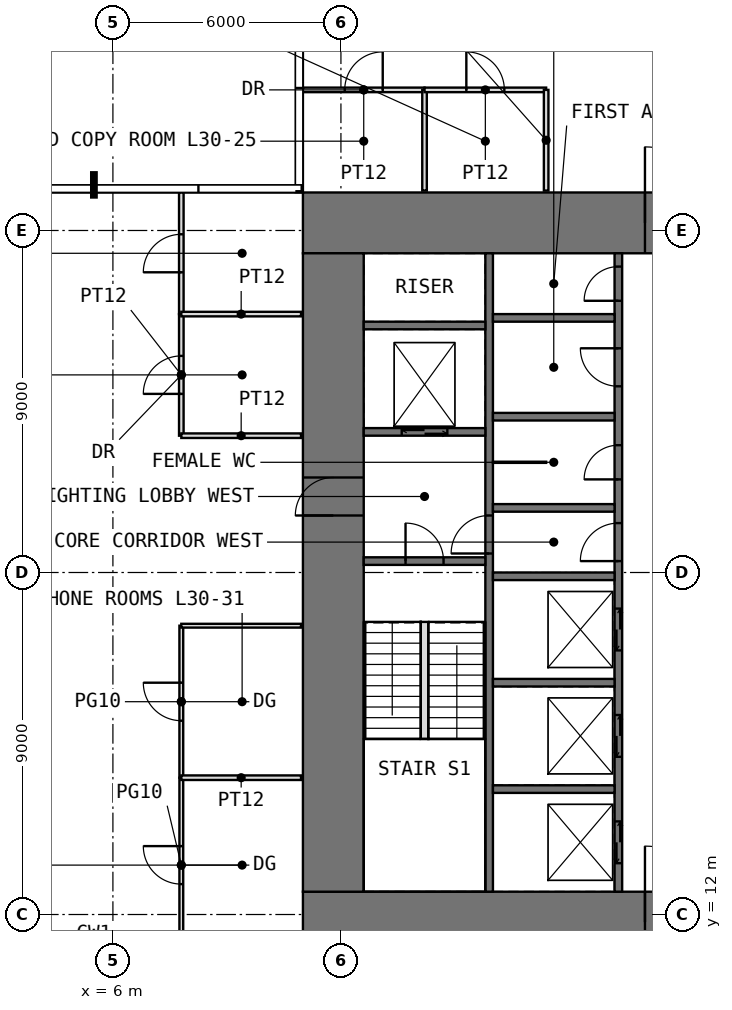
"""IFC4 building model, lengths in metres.
Left out: names, types, materials, properties, quantities, classifications, styles, units other than length and angle.
Written with IfcOpenShell. Run it as: python <this file> out.ifc"""

import sys

from ifc_helpers import new_model, si_unit, direction, frame, frame_2d, origin, place, context, subcontext, project, spatial, rectangle, extrude, element, fill, save


model = new_model("IFC4")
c1 = context("Model", 3, precision=1e-05, world=origin(), true_north=direction((0.0, 1.0)))
c2 = subcontext(c1, "Body", "Model", "MODEL_VIEW")
j1 = project(units=[si_unit("LENGTHUNIT", "METRE"), si_unit("PLANEANGLEUNIT", "RADIAN")], contexts=[c1])
p1 = place(None, origin())
s1 = spatial("IfcSite", under=j1, at=p1, CompositionType="ELEMENT")
p2 = place(p1, origin())
s2 = spatial("IfcBuilding", under=s1, at=p2, CompositionType="ELEMENT")
p3 = place(p2, frame((0.0, 0.0, 128.5)))
s3 = spatial("IfcBuildingStorey", under=s2, at=p3, CompositionType="ELEMENT", Elevation=128.5)
p4 = place(p3, frame((11.0, 11.8, -0.05), z_axis=(0.0, 0.0, 1.0), x_axis=(1.0, 0.0, 0.0)))
e1 = element("IfcWall", 1, at=p4, inside=s3, PredefinedType="SHEAR", context=c2, shape_type="SweptSolid", body=[
    extrude(rectangle(XDim=20.0, YDim=1.6, at=frame_2d((10.0, 0.0))), origin(), (0.0, 0.0, 1.0), 4.0),
])
p5 = place(p4, frame((9.0, 0.0, 0.05)))
e2 = element("IfcOpeningElement", 2, at=p5, cuts=e1, PredefinedType="OPENING", context=c2, shape_type="SweptSolid", body=[
    extrude(rectangle(XDim=2.0, YDim=2.2, at=frame_2d((1.0, 1.1))), frame((0.0, 0.81, 0.0), z_axis=(0.0, -1.0, 0.0), x_axis=(1.0, 0.0, 0.0)), (0.0, 0.0, 1.0), 1.62),
])
p6 = place(p3, frame((11.0, 30.2, -0.05), z_axis=(0.0, 0.0, 1.0), x_axis=(1.0, 0.0, 0.0)))
e3 = element("IfcWall", 3, at=p6, inside=s3, PredefinedType="SHEAR", context=c2, shape_type="SweptSolid", body=[
    extrude(rectangle(XDim=20.0, YDim=1.6, at=frame_2d((10.0, 0.0))), origin(), (0.0, 0.0, 1.0), 4.0),
])
p7 = place(p6, frame((9.0, 0.0, 0.05)))
e4 = element("IfcOpeningElement", 4, at=p7, cuts=e3, PredefinedType="OPENING", context=c2, shape_type="SweptSolid", body=[
    extrude(rectangle(XDim=2.0, YDim=2.2, at=frame_2d((1.0, 1.1))), frame((0.0, 0.81, 0.0), z_axis=(0.0, -1.0, 0.0), x_axis=(1.0, 0.0, 0.0)), (0.0, 0.0, 1.0), 1.62),
])
p8 = place(p3, frame((11.8, 12.6, -0.05), z_axis=(0.0, 0.0, 1.0), x_axis=(0.0, 1.0, 0.0)))
e5 = element("IfcWall", 5, at=p8, inside=s3, PredefinedType="SHEAR", context=c2, shape_type="SweptSolid", body=[
    extrude(rectangle(XDim=16.8, YDim=1.6, at=frame_2d((8.4, 0.0))), origin(), (0.0, 0.0, 1.0), 4.0),
])
p9 = place(p8, frame((9.9, 0.0, 0.05)))
e6 = element("IfcOpeningElement", 6, at=p9, cuts=e5, PredefinedType="OPENING", context=c2, shape_type="SweptSolid", body=[
    extrude(rectangle(XDim=1.0, YDim=2.2, at=frame_2d((0.5, 1.1))), frame((0.0, 0.81, 0.0), z_axis=(0.0, -1.0, 0.0), x_axis=(1.0, 0.0, 0.0)), (0.0, 0.0, 1.0), 1.62),
])
p10 = place(p3, frame((15.9, 12.6, -0.05), z_axis=(0.0, 0.0, 1.0), x_axis=(0.0, 1.0, 0.0)))
e7 = element("IfcWall", 7, at=p10, inside=s3, PredefinedType="SHEAR", context=c2, shape_type="SweptSolid", body=[
    extrude(rectangle(XDim=16.8, YDim=0.2, at=frame_2d((8.4, 0.0))), origin(), (0.0, 0.0, 1.0), 4.0),
])
p11 = place(p10, frame((8.9, 0.0, 0.05)))
e8 = element("IfcOpeningElement", 8, at=p11, cuts=e7, PredefinedType="OPENING", context=c2, shape_type="SweptSolid", body=[
    extrude(rectangle(XDim=1.0, YDim=2.2, at=frame_2d((0.5, 1.1))), frame((0.0, 0.11, 0.0), z_axis=(0.0, -1.0, 0.0), x_axis=(1.0, 0.0, 0.0)), (0.0, 0.0, 1.0), 0.22),
])
p12 = place(p3, frame((19.3, 12.6, -0.05), z_axis=(0.0, 0.0, 1.0), x_axis=(0.0, 1.0, 0.0)))
e9 = element("IfcWall", 9, at=p12, inside=s3, PredefinedType="SHEAR", context=c2, shape_type="SweptSolid", body=[
    extrude(rectangle(XDim=16.8, YDim=0.2, at=frame_2d((8.4, 0.0))), origin(), (0.0, 0.0, 1.0), 4.0),
])
p13 = place(p12, frame((8.7, 0.0, 0.05)))
e10 = element("IfcOpeningElement", 10, at=p13, cuts=e9, PredefinedType="OPENING", context=c2, shape_type="SweptSolid", body=[
    extrude(rectangle(XDim=1.0, YDim=2.2, at=frame_2d((0.5, 1.1))), frame((0.0, 0.11, 0.0), z_axis=(0.0, -1.0, 0.0), x_axis=(1.0, 0.0, 0.0)), (0.0, 0.0, 1.0), 0.22),
])
p14 = place(p12, frame((10.85, 0.0, 0.05)))
e11 = element("IfcOpeningElement", 11, at=p14, cuts=e9, PredefinedType="OPENING", context=c2, shape_type="SweptSolid", body=[
    extrude(rectangle(XDim=0.9, YDim=2.2, at=frame_2d((0.45, 1.1))), frame((0.0, 0.11, 0.0), z_axis=(0.0, -1.0, 0.0), x_axis=(1.0, 0.0, 0.0)), (0.0, 0.0, 1.0), 0.22),
])
p15 = place(p12, frame((13.3, 0.0, 0.05)))
e12 = element("IfcOpeningElement", 12, at=p15, cuts=e9, PredefinedType="OPENING", context=c2, shape_type="SweptSolid", body=[
    extrude(rectangle(XDim=1.0, YDim=2.2, at=frame_2d((0.5, 1.1))), frame((0.0, 0.11, 0.0), z_axis=(0.0, -1.0, 0.0), x_axis=(1.0, 0.0, 0.0)), (0.0, 0.0, 1.0), 0.22),
])
p16 = place(p12, frame((15.55, 0.0, 0.05)))
e13 = element("IfcOpeningElement", 13, at=p16, cuts=e9, PredefinedType="OPENING", context=c2, shape_type="SweptSolid", body=[
    extrude(rectangle(XDim=0.9, YDim=2.2, at=frame_2d((0.45, 1.1))), frame((0.0, 0.11, 0.0), z_axis=(0.0, -1.0, 0.0), x_axis=(1.0, 0.0, 0.0)), (0.0, 0.0, 1.0), 0.22),
])
p17 = place(p12, frame((0.75, 0.0, 0.05)))
e14 = element("IfcOpeningElement", 14, at=p17, cuts=e9, PredefinedType="OPENING", context=c2, shape_type="SweptSolid", body=[
    extrude(rectangle(XDim=1.1, YDim=2.2, at=frame_2d((0.55, 1.1))), frame((0.0, 0.11, 0.0), z_axis=(0.0, -1.0, 0.0), x_axis=(1.0, 0.0, 0.0)), (0.0, 0.0, 1.0), 0.22),
])
p18 = place(p12, frame((3.55, 0.0, 0.05)))
e15 = element("IfcOpeningElement", 15, at=p18, cuts=e9, PredefinedType="OPENING", context=c2, shape_type="SweptSolid", body=[
    extrude(rectangle(XDim=1.1, YDim=2.2, at=frame_2d((0.55, 1.1))), frame((0.0, 0.11, 0.0), z_axis=(0.0, -1.0, 0.0), x_axis=(1.0, 0.0, 0.0)), (0.0, 0.0, 1.0), 0.22),
])
p19 = place(p12, frame((6.35, 0.0, 0.05)))
e16 = element("IfcOpeningElement", 16, at=p19, cuts=e9, PredefinedType="OPENING", context=c2, shape_type="SweptSolid", body=[
    extrude(rectangle(XDim=1.1, YDim=2.2, at=frame_2d((0.55, 1.1))), frame((0.0, 0.11, 0.0), z_axis=(0.0, -1.0, 0.0), x_axis=(1.0, 0.0, 0.0)), (0.0, 0.0, 1.0), 0.22),
])
p20 = place(p3, frame((12.6, 21.3, -0.05), z_axis=(0.0, 0.0, 1.0), x_axis=(1.0, 0.0, 0.0)))
e17 = element("IfcWall", 17, at=p20, inside=s3, PredefinedType="SHEAR", context=c2, shape_type="SweptSolid", body=[
    extrude(rectangle(XDim=3.2, YDim=0.2, at=frame_2d((1.6, 0.0))), origin(), (0.0, 0.0, 1.0), 4.0),
])
p21 = place(p20, frame((1.1, 0.0, 0.05)))
e18 = element("IfcOpeningElement", 18, at=p21, cuts=e17, PredefinedType="OPENING", context=c2, shape_type="SweptSolid", body=[
    extrude(rectangle(XDim=1.0, YDim=2.2, at=frame_2d((0.5, 1.1))), frame((0.0, 0.11, 0.0), z_axis=(0.0, -1.0, 0.0), x_axis=(1.0, 0.0, 0.0)), (0.0, 0.0, 1.0), 0.22),
])
p22 = place(p3, frame((12.6, 24.7, -0.05), z_axis=(0.0, 0.0, 1.0), x_axis=(1.0, 0.0, 0.0)))
e19 = element("IfcWall", 19, at=p22, inside=s3, PredefinedType="SHEAR", context=c2, shape_type="SweptSolid", body=[
    extrude(rectangle(XDim=3.2, YDim=0.2, at=frame_2d((1.6, 0.0))), origin(), (0.0, 0.0, 1.0), 4.0),
])
p23 = place(p22, frame((1.0, 0.0, 0.05)))
e20 = element("IfcOpeningElement", 20, at=p23, cuts=e19, PredefinedType="OPENING", context=c2, shape_type="SweptSolid", body=[
    extrude(rectangle(XDim=1.2, YDim=2.2, at=frame_2d((0.6, 1.1))), frame((0.0, 0.11, 0.0), z_axis=(0.0, -1.0, 0.0), x_axis=(1.0, 0.0, 0.0)), (0.0, 0.0, 1.0), 0.22),
])
for number, where, z_axis, x_axis in (
    (21, (12.6, 27.5, -0.05), (0.0, 0.0, 1.0), (1.0, 0.0, 0.0)),
    (22, (16.0, 15.3, -0.05), (0.0, 0.0, 1.0), (1.0, 0.0, 0.0)),
    (23, (16.0, 18.1, -0.05), (0.0, 0.0, 1.0), (1.0, 0.0, 0.0)),
    (24, (16.0, 20.9, -0.05), (0.0, 0.0, 1.0), (1.0, 0.0, 0.0)),
    (25, (16.0, 22.7, -0.05), (0.0, 0.0, 1.0), (1.0, 0.0, 0.0)),
    (26, (16.0, 25.1, -0.05), (0.0, 0.0, 1.0), (1.0, 0.0, 0.0)),
    (27, (16.0, 27.7, -0.05), (0.0, 0.0, 1.0), (1.0, 0.0, 0.0)),
):
    element("IfcWall", number, at=place(p3, frame(where, z_axis=z_axis, x_axis=x_axis)), inside=s3, PredefinedType="SHEAR", context=c2, shape_type="SweptSolid", body=[
        extrude(rectangle(XDim=3.2, YDim=0.2, at=frame_2d((1.6, 0.0))), origin(), (0.0, 0.0, 1.0), 4.0),
    ])
p24 = place(p3, frame((16.0, 23.9, 0.0), z_axis=(0.0, 0.0, 1.0), x_axis=(1.0, 0.0, 0.0)))
e28 = element("IfcWall", 28, at=p24, inside=s3, PredefinedType="PARTITIONING", context=c2, shape_type="SweptSolid", body=[
    extrude(rectangle(XDim=1.4, YDim=0.03, at=frame_2d((0.7, 0.0))), origin(), (0.0, 0.0, 1.0), 3.75),
])
p25 = place(p3, frame((7.8, 11.0, 0.0), z_axis=(0.0, 0.0, 1.0), x_axis=(0.0, 1.0, 0.0)))
e29 = element("IfcWall", 29, at=p25, inside=s3, PredefinedType="PARTITIONING", context=c2, shape_type="SweptSolid", body=[
    extrude(rectangle(XDim=4.6, YDim=0.1, at=frame_2d((2.3, 0.0))), origin(), (0.0, 0.0, 1.0), 3.75),
])
p26 = place(p25, frame((1.8, 0.0, 0.0)))
e30 = element("IfcOpeningElement", 30, at=p26, cuts=e29, PredefinedType="OPENING", context=c2, shape_type="SweptSolid", body=[
    extrude(rectangle(XDim=1.0, YDim=2.4, at=frame_2d((0.5, 1.2))), frame((0.0, 0.06, 0.0), z_axis=(0.0, -1.0, 0.0), x_axis=(1.0, 0.0, 0.0)), (0.0, 0.0, 1.0), 0.12),
])
p27 = place(p3, frame((7.8, 15.6, 0.0), z_axis=(0.0, 0.0, 1.0), x_axis=(0.0, 1.0, 0.0)))
e31 = element("IfcWall", 31, at=p27, inside=s3, PredefinedType="PARTITIONING", context=c2, shape_type="SweptSolid", body=[
    extrude(rectangle(XDim=4.0, YDim=0.1, at=frame_2d((2.0, 0.0))), origin(), (0.0, 0.0, 1.0), 3.75),
])
p28 = place(p27, frame((1.5, 0.0, 0.0)))
e32 = element("IfcOpeningElement", 32, at=p28, cuts=e31, PredefinedType="OPENING", context=c2, shape_type="SweptSolid", body=[
    extrude(rectangle(XDim=1.0, YDim=2.4, at=frame_2d((0.5, 1.2))), frame((0.0, 0.06, 0.0), z_axis=(0.0, -1.0, 0.0), x_axis=(1.0, 0.0, 0.0)), (0.0, 0.0, 1.0), 0.12),
])
p29 = place(p3, frame((7.8, 15.6, 0.0), z_axis=(0.0, 0.0, 1.0), x_axis=(1.0, 0.0, 0.0)))
e33 = element("IfcWall", 33, at=p29, inside=s3, PredefinedType="PARTITIONING", context=c2, shape_type="SweptSolid", body=[
    extrude(rectangle(XDim=3.15, YDim=0.12, at=frame_2d((1.575, 0.0))), origin(), (0.0, 0.0, 1.0), 3.75),
])
p30 = place(p3, frame((7.8, 19.6, 0.0), z_axis=(0.0, 0.0, 1.0), x_axis=(1.0, 0.0, 0.0)))
e34 = element("IfcWall", 34, at=p30, inside=s3, PredefinedType="PARTITIONING", context=c2, shape_type="SweptSolid", body=[
    extrude(rectangle(XDim=3.15, YDim=0.1, at=frame_2d((1.575, 0.0))), origin(), (0.0, 0.0, 1.0), 3.75),
])
p31 = place(p3, frame((7.8, 24.6, 0.0), z_axis=(0.0, 0.0, 1.0), x_axis=(0.0, 1.0, 0.0)))
e35 = element("IfcWall", 35, at=p31, inside=s3, PredefinedType="PARTITIONING", context=c2, shape_type="SweptSolid", body=[
    extrude(rectangle(XDim=3.2, YDim=0.12, at=frame_2d((1.6, 0.0))), origin(), (0.0, 0.0, 1.0), 3.75),
])
p32 = place(p31, frame((1.1, 0.0, 0.0)))
e36 = element("IfcOpeningElement", 36, at=p32, cuts=e35, PredefinedType="OPENING", context=c2, shape_type="SweptSolid", body=[
    extrude(rectangle(XDim=1.0, YDim=2.2, at=frame_2d((0.5, 1.1))), frame((0.0, 0.07, 0.0), z_axis=(0.0, -1.0, 0.0), x_axis=(1.0, 0.0, 0.0)), (0.0, 0.0, 1.0), 0.14),
])
p33 = place(p3, frame((7.8, 24.6, 0.0), z_axis=(0.0, 0.0, 1.0), x_axis=(1.0, 0.0, 0.0)))
e37 = element("IfcWall", 37, at=p33, inside=s3, PredefinedType="PARTITIONING", context=c2, shape_type="SweptSolid", body=[
    extrude(rectangle(XDim=3.15, YDim=0.12, at=frame_2d((1.575, 0.0))), origin(), (0.0, 0.0, 1.0), 3.75),
])
p34 = place(p3, frame((7.8, 27.8, 0.0), z_axis=(0.0, 0.0, 1.0), x_axis=(0.0, 1.0, 0.0)))
e38 = element("IfcWall", 38, at=p34, inside=s3, PredefinedType="PARTITIONING", context=c2, shape_type="SweptSolid", body=[
    extrude(rectangle(XDim=3.2, YDim=0.12, at=frame_2d((1.6, 0.0))), origin(), (0.0, 0.0, 1.0), 3.75),
])
p35 = place(p34, frame((1.1, 0.0, 0.0)))
e39 = element("IfcOpeningElement", 39, at=p35, cuts=e38, PredefinedType="OPENING", context=c2, shape_type="SweptSolid", body=[
    extrude(rectangle(XDim=1.0, YDim=2.2, at=frame_2d((0.5, 1.1))), frame((0.0, 0.07, 0.0), z_axis=(0.0, -1.0, 0.0), x_axis=(1.0, 0.0, 0.0)), (0.0, 0.0, 1.0), 0.14),
])
p36 = place(p3, frame((7.8, 27.8, 0.0), z_axis=(0.0, 0.0, 1.0), x_axis=(1.0, 0.0, 0.0)))
e40 = element("IfcWall", 40, at=p36, inside=s3, PredefinedType="PARTITIONING", context=c2, shape_type="SweptSolid", body=[
    extrude(rectangle(XDim=3.15, YDim=0.12, at=frame_2d((1.575, 0.0))), origin(), (0.0, 0.0, 1.0), 3.75),
])
p37 = place(p3, frame((11.0, 33.7, 0.0), z_axis=(0.0, 0.0, 1.0), x_axis=(1.0, 0.0, 0.0)))
e41 = element("IfcWall", 41, at=p37, inside=s3, PredefinedType="PARTITIONING", context=c2, shape_type="SweptSolid", body=[
    extrude(rectangle(XDim=3.2, YDim=0.12, at=frame_2d((1.6, 0.0))), origin(), (0.0, 0.0, 1.0), 3.75),
])
p38 = place(p37, frame((1.1, 0.0, 0.0)))
e42 = element("IfcOpeningElement", 42, at=p38, cuts=e41, PredefinedType="OPENING", context=c2, shape_type="SweptSolid", body=[
    extrude(rectangle(XDim=1.0, YDim=2.2, at=frame_2d((0.5, 1.1))), frame((0.0, 0.07, 0.0), z_axis=(0.0, -1.0, 0.0), x_axis=(1.0, 0.0, 0.0)), (0.0, 0.0, 1.0), 0.14),
])
p39 = place(p3, frame((14.2, 31.05, 0.0), z_axis=(0.0, 0.0, 1.0), x_axis=(0.0, 1.0, 0.0)))
e43 = element("IfcWall", 43, at=p39, inside=s3, PredefinedType="PARTITIONING", context=c2, shape_type="SweptSolid", body=[
    extrude(rectangle(XDim=2.65, YDim=0.12, at=frame_2d((1.325, 0.0))), origin(), (0.0, 0.0, 1.0), 3.75),
])
p40 = place(p3, frame((14.2, 33.7, 0.0), z_axis=(0.0, 0.0, 1.0), x_axis=(1.0, 0.0, 0.0)))
e44 = element("IfcWall", 44, at=p40, inside=s3, PredefinedType="PARTITIONING", context=c2, shape_type="SweptSolid", body=[
    extrude(rectangle(XDim=3.2, YDim=0.12, at=frame_2d((1.6, 0.0))), origin(), (0.0, 0.0, 1.0), 3.75),
])
p41 = place(p40, frame((1.1, 0.0, 0.0)))
e45 = element("IfcOpeningElement", 45, at=p41, cuts=e44, PredefinedType="OPENING", context=c2, shape_type="SweptSolid", body=[
    extrude(rectangle(XDim=1.0, YDim=2.2, at=frame_2d((0.5, 1.1))), frame((0.0, 0.07, 0.0), z_axis=(0.0, -1.0, 0.0), x_axis=(1.0, 0.0, 0.0)), (0.0, 0.0, 1.0), 0.14),
])
p42 = place(p3, frame((17.4, 31.05, 0.0), z_axis=(0.0, 0.0, 1.0), x_axis=(0.0, 1.0, 0.0)))
e46 = element("IfcWall", 46, at=p42, inside=s3, PredefinedType="PARTITIONING", context=c2, shape_type="SweptSolid", body=[
    extrude(rectangle(XDim=2.65, YDim=0.12, at=frame_2d((1.325, 0.0))), origin(), (0.0, 0.0, 1.0), 3.75),
])
p43 = place(p3, frame((14.2, 16.62, 0.0), z_axis=(0.0, 0.0, 1.0), x_axis=(0.0, 1.0, 0.0)))
e47 = element("IfcWall", 47, at=p43, inside=s3, PredefinedType="PARTITIONING", context=c2, shape_type="SweptSolid", body=[
    extrude(rectangle(XDim=3.08, YDim=0.2, at=frame_2d((1.54, 0.0))), origin(), (0.0, 0.0, 1.0), 4.0),
])
p44 = place(p5, origin())
e48 = element("IfcDoor", 48, at=p44, inside=s3, OperationType="DOUBLE_DOOR_SINGLE_SWING", PredefinedType="DOOR", context=c2, shape_type="SweptSolid", body=[
    extrude(rectangle(XDim=2.0, YDim=2.2, at=frame_2d((1.0, 1.1))), frame((0.0, 0.025, 0.0), z_axis=(0.0, -1.0, 0.0), x_axis=(1.0, 0.0, 0.0)), (0.0, 0.0, 1.0), 0.05),
])
fill(e2, e48)
p45 = place(p7, origin())
e49 = element("IfcDoor", 49, at=p45, inside=s3, OperationType="DOUBLE_DOOR_SINGLE_SWING", PredefinedType="DOOR", context=c2, shape_type="SweptSolid", body=[
    extrude(rectangle(XDim=2.0, YDim=2.2, at=frame_2d((1.0, 1.1))), frame((0.0, 0.025, 0.0), z_axis=(0.0, -1.0, 0.0), x_axis=(1.0, 0.0, 0.0)), (0.0, 0.0, 1.0), 0.05),
])
fill(e4, e49)
p46 = place(p9, origin())
e50 = element("IfcDoor", 50, at=p46, inside=s3, OperationType="SINGLE_SWING_LEFT", PredefinedType="DOOR", context=c2, shape_type="SweptSolid", body=[
    extrude(rectangle(XDim=1.0, YDim=2.2, at=frame_2d((0.5, 1.1))), frame((0.0, 0.025, 0.0), z_axis=(0.0, -1.0, 0.0), x_axis=(1.0, 0.0, 0.0)), (0.0, 0.0, 1.0), 0.05),
])
fill(e6, e50)
p47 = place(p21, origin())
e51 = element("IfcDoor", 51, at=p47, inside=s3, OperationType="SINGLE_SWING_LEFT", PredefinedType="DOOR", context=c2, shape_type="SweptSolid", body=[
    extrude(rectangle(XDim=1.0, YDim=2.2, at=frame_2d((0.5, 1.1))), frame((0.0, 0.025, 0.0), z_axis=(0.0, -1.0, 0.0), x_axis=(1.0, 0.0, 0.0)), (0.0, 0.0, 1.0), 0.05),
])
fill(e18, e51)
p48 = place(p11, origin())
e52 = element("IfcDoor", 52, at=p48, inside=s3, OperationType="SINGLE_SWING_LEFT", PredefinedType="DOOR", context=c2, shape_type="SweptSolid", body=[
    extrude(rectangle(XDim=1.0, YDim=2.2, at=frame_2d((0.5, 1.1))), frame((0.0, 0.025, 0.0), z_axis=(0.0, -1.0, 0.0), x_axis=(1.0, 0.0, 0.0)), (0.0, 0.0, 1.0), 0.05),
])
fill(e8, e52)
p49 = place(p13, origin())
e53 = element("IfcDoor", 53, at=p49, inside=s3, OperationType="SINGLE_SWING_LEFT", PredefinedType="DOOR", context=c2, shape_type="SweptSolid", body=[
    extrude(rectangle(XDim=1.0, YDim=2.2, at=frame_2d((0.5, 1.1))), frame((0.0, 0.025, 0.0), z_axis=(0.0, -1.0, 0.0), x_axis=(1.0, 0.0, 0.0)), (0.0, 0.0, 1.0), 0.05),
])
fill(e10, e53)
p50 = place(p14, origin())
e54 = element("IfcDoor", 54, at=p50, inside=s3, OperationType="SINGLE_SWING_LEFT", PredefinedType="DOOR", context=c2, shape_type="SweptSolid", body=[
    extrude(rectangle(XDim=0.9, YDim=2.2, at=frame_2d((0.45, 1.1))), frame((0.0, 0.025, 0.0), z_axis=(0.0, -1.0, 0.0), x_axis=(1.0, 0.0, 0.0)), (0.0, 0.0, 1.0), 0.05),
])
fill(e11, e54)
p51 = place(p15, origin())
e55 = element("IfcDoor", 55, at=p51, inside=s3, OperationType="SINGLE_SWING_RIGHT", PredefinedType="DOOR", context=c2, shape_type="SweptSolid", body=[
    extrude(rectangle(XDim=1.0, YDim=2.2, at=frame_2d((0.5, 1.1))), frame((0.0, 0.025, 0.0), z_axis=(0.0, -1.0, 0.0), x_axis=(1.0, 0.0, 0.0)), (0.0, 0.0, 1.0), 0.05),
])
fill(e12, e55)
p52 = place(p16, origin())
e56 = element("IfcDoor", 56, at=p52, inside=s3, OperationType="SINGLE_SWING_LEFT", PredefinedType="DOOR", context=c2, shape_type="SweptSolid", body=[
    extrude(rectangle(XDim=0.9, YDim=2.2, at=frame_2d((0.45, 1.1))), frame((0.0, 0.025, 0.0), z_axis=(0.0, -1.0, 0.0), x_axis=(1.0, 0.0, 0.0)), (0.0, 0.0, 1.0), 0.05),
])
fill(e13, e56)
p53 = place(p38, origin())
e57 = element("IfcDoor", 57, at=p53, inside=s3, OperationType="SINGLE_SWING_RIGHT", PredefinedType="DOOR", context=c2, shape_type="SweptSolid", body=[
    extrude(rectangle(XDim=1.0, YDim=2.2, at=frame_2d((0.5, 1.1))), frame((0.0, 0.025, 0.0), z_axis=(0.0, -1.0, 0.0), x_axis=(1.0, 0.0, 0.0)), (0.0, 0.0, 1.0), 0.05),
])
fill(e42, e57)
p54 = place(p41, origin())
e58 = element("IfcDoor", 58, at=p54, inside=s3, OperationType="SINGLE_SWING_LEFT", PredefinedType="DOOR", context=c2, shape_type="SweptSolid", body=[
    extrude(rectangle(XDim=1.0, YDim=2.2, at=frame_2d((0.5, 1.1))), frame((0.0, 0.025, 0.0), z_axis=(0.0, -1.0, 0.0), x_axis=(1.0, 0.0, 0.0)), (0.0, 0.0, 1.0), 0.05),
])
fill(e45, e58)
p55 = place(p26, origin())
e59 = element("IfcDoor", 59, at=p55, inside=s3, OperationType="SINGLE_SWING_RIGHT", PredefinedType="DOOR", context=c2, shape_type="SweptSolid", body=[
    extrude(rectangle(XDim=1.0, YDim=2.4, at=frame_2d((0.5, 1.2))), frame((0.0, 0.025, 0.0), z_axis=(0.0, -1.0, 0.0), x_axis=(1.0, 0.0, 0.0)), (0.0, 0.0, 1.0), 0.05),
])
fill(e30, e59)
p56 = place(p28, origin())
e60 = element("IfcDoor", 60, at=p56, inside=s3, OperationType="SINGLE_SWING_RIGHT", PredefinedType="DOOR", context=c2, shape_type="SweptSolid", body=[
    extrude(rectangle(XDim=1.0, YDim=2.4, at=frame_2d((0.5, 1.2))), frame((0.0, 0.025, 0.0), z_axis=(0.0, -1.0, 0.0), x_axis=(1.0, 0.0, 0.0)), (0.0, 0.0, 1.0), 0.05),
])
fill(e32, e60)
p57 = place(p32, origin())
e61 = element("IfcDoor", 61, at=p57, inside=s3, OperationType="SINGLE_SWING_LEFT", PredefinedType="DOOR", context=c2, shape_type="SweptSolid", body=[
    extrude(rectangle(XDim=1.0, YDim=2.2, at=frame_2d((0.5, 1.1))), frame((0.0, 0.025, 0.0), z_axis=(0.0, -1.0, 0.0), x_axis=(1.0, 0.0, 0.0)), (0.0, 0.0, 1.0), 0.05),
])
fill(e36, e61)
p58 = place(p35, origin())
e62 = element("IfcDoor", 62, at=p58, inside=s3, OperationType="SINGLE_SWING_LEFT", PredefinedType="DOOR", context=c2, shape_type="SweptSolid", body=[
    extrude(rectangle(XDim=1.0, YDim=2.2, at=frame_2d((0.5, 1.1))), frame((0.0, 0.025, 0.0), z_axis=(0.0, -1.0, 0.0), x_axis=(1.0, 0.0, 0.0)), (0.0, 0.0, 1.0), 0.05),
])
fill(e39, e62)
p59 = place(p17, origin())
e63 = element("IfcDoor", 63, at=p59, inside=s3, OperationType="DOUBLE_DOOR_SLIDING", PredefinedType="DOOR", context=c2, shape_type="SweptSolid", body=[
    extrude(rectangle(XDim=1.1, YDim=2.2, at=frame_2d((0.55, 1.1))), frame((0.0, 0.025, 0.0), z_axis=(0.0, -1.0, 0.0), x_axis=(1.0, 0.0, 0.0)), (0.0, 0.0, 1.0), 0.05),
])
fill(e14, e63)
p60 = place(p18, origin())
e64 = element("IfcDoor", 64, at=p60, inside=s3, OperationType="DOUBLE_DOOR_SLIDING", PredefinedType="DOOR", context=c2, shape_type="SweptSolid", body=[
    extrude(rectangle(XDim=1.1, YDim=2.2, at=frame_2d((0.55, 1.1))), frame((0.0, 0.025, 0.0), z_axis=(0.0, -1.0, 0.0), x_axis=(1.0, 0.0, 0.0)), (0.0, 0.0, 1.0), 0.05),
])
fill(e15, e64)
p61 = place(p19, origin())
e65 = element("IfcDoor", 65, at=p61, inside=s3, OperationType="DOUBLE_DOOR_SLIDING", PredefinedType="DOOR", context=c2, shape_type="SweptSolid", body=[
    extrude(rectangle(XDim=1.1, YDim=2.2, at=frame_2d((0.55, 1.1))), frame((0.0, 0.025, 0.0), z_axis=(0.0, -1.0, 0.0), x_axis=(1.0, 0.0, 0.0)), (0.0, 0.0, 1.0), 0.05),
])
fill(e16, e65)
p62 = place(p23, origin())
e66 = element("IfcDoor", 66, at=p62, inside=s3, OperationType="DOUBLE_DOOR_SLIDING", PredefinedType="DOOR", context=c2, shape_type="SweptSolid", body=[
    extrude(rectangle(XDim=1.2, YDim=2.2, at=frame_2d((0.6, 1.1))), frame((0.0, 0.025, 0.0), z_axis=(0.0, -1.0, 0.0), x_axis=(1.0, 0.0, 0.0)), (0.0, 0.0, 1.0), 0.05),
])
fill(e20, e66)
save(model, sys.argv[1])
